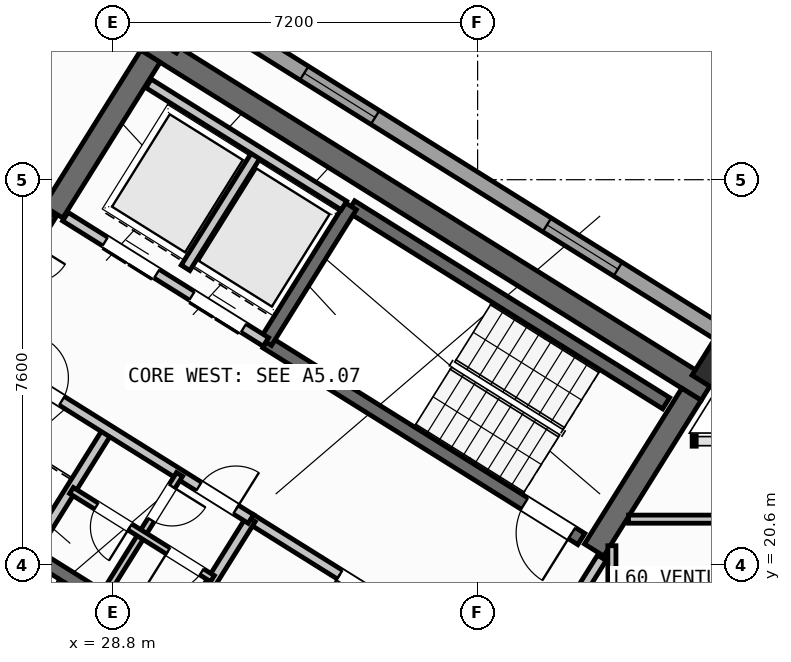
"""IFC4 building model, lengths in metres.
Left out: names, types, materials, properties, quantities, classifications, styles, units other than length and angle.
Written with IfcOpenShell. Run it as: python <this file> out.ifc"""

import sys

from ifc_helpers import new_model, si_unit, direction, frame, frame_2d, origin, origin_2d, place, context, subcontext, project, spatial, rectangle, hollow_rectangle, extrude, source, transform, mapped, element, fill, save


model = new_model("IFC4")
c1 = context("Model", 3, precision=1e-05, world=origin(), true_north=direction((0.0, 1.0)))
c2 = subcontext(c1, "Body", "Model", "MODEL_VIEW")
j1 = project(units=[si_unit("LENGTHUNIT", "METRE"), si_unit("PLANEANGLEUNIT", "RADIAN")], contexts=[c1])
p1 = place(None, origin())
s1 = spatial("IfcSite", under=j1, at=p1, CompositionType="ELEMENT")
p2 = place(p1, origin())
s2 = spatial("IfcBuilding", under=s1, at=p2, CompositionType="ELEMENT")
p3 = place(p2, frame((0.0, 0.0, 238.5)))
s3 = spatial("IfcBuildingStorey", under=s2, at=p3, CompositionType="ELEMENT", Elevation=238.5)
p4 = place(p3, frame((40.531, 24.036, 0.0), z_axis=(0.0, 0.0, 1.0), x_axis=(-0.848048787466, 0.529918157905, 0.0)))
e1 = element("IfcWall", 1, at=p4, inside=s3, PredefinedType="SHEAR", context=c2, shape_type="SweptSolid", body=[
    extrude(rectangle(XDim=13.04, YDim=0.45, at=frame_2d((6.52, 0.0))), origin(), (0.0, 0.0, 1.0), 3.35),
])
for number, where, z_axis, x_axis in (
    (2, (40.221, 23.965, 0.0), (0.0, 0.0, 1.0), (-0.53, -0.848, 0.0)),
    (3, (29.544, 30.636, 0.0), (0.0, 0.0, 1.0), (-0.53, -0.848, 0.0)),
):
    element("IfcWall", number, at=place(p3, frame(where, z_axis=z_axis, x_axis=x_axis)), inside=s3, PredefinedType="SHEAR", context=c2, shape_type="SweptSolid", body=[
        extrude(rectangle(XDim=3.625, YDim=0.45, at=frame_2d((1.812, 0.0))), origin(), (0.0, 0.0, 1.0), 3.35),
    ])
m1 = source(origin(), c2, "Body", "SweptSolid", [
    extrude(hollow_rectangle(XDim=0.8, YDim=0.8, WallThickness=0.032, at=origin_2d()), origin(), (0.0, 0.0, 1.0), 3.6),
])
for number, where, z_axis, x_axis in (
    (4, (40.783, 24.469, 0.0), (0.0, 0.0, 1.0), (-0.848, 0.53, 0.0)),
    (5, (29.928, 31.251, 0.0), (0.0, 0.0, 1.0), (-0.848, 0.53, 0.0)),
):
    element("IfcColumn", number, at=place(p3, frame(where, z_axis=z_axis, x_axis=x_axis)), inside=s3, PredefinedType="COLUMN", context=c2, shape_type="MappedRepresentation", body=[
        mapped(m1, transform((0.0, 0.0, 0.0), scale=1.0)),
    ])
p5 = place(p3, frame((29.268, 6.429, 0.0), z_axis=(0.0, 0.0, 1.0), x_axis=(-0.848049971435, 0.529916263149, 0.0)))
e6 = element("IfcWall", 6, at=p5, inside=s3, PredefinedType="STANDARD", context=c2, shape_type="SweptSolid", body=[
    extrude(rectangle(XDim=31.588, YDim=0.32, at=frame_2d((15.794, 0.0))), origin(), (0.0, 0.0, 1.0), 3.35),
])
p6 = place(p5, frame((16.235, 0.0, 0.0)))
e7 = element("IfcOpeningElement", 7, at=p6, cuts=e6, PredefinedType="OPENING", context=c2, shape_type="SweptSolid", body=[
    extrude(rectangle(XDim=1.2, YDim=2.15, at=frame_2d((0.6, 1.075))), frame((0.0, 0.17, 0.0), z_axis=(0.0, -1.0, 0.0), x_axis=(1.0, 0.0, 0.0)), (0.0, 0.0, 1.0), 0.34),
])
p7 = place(p5, frame((3.859, 0.0, 0.9)))
e8 = element("IfcOpeningElement", 8, at=p7, cuts=e6, PredefinedType="OPENING", context=c2, shape_type="SweptSolid", body=[
    extrude(rectangle(XDim=1.65, YDim=1.45, at=frame_2d((0.825, 0.725))), frame((0.0, 0.17, 0.0), z_axis=(0.0, -1.0, 0.0), x_axis=(1.0, 0.0, 0.0)), (0.0, 0.0, 1.0), 0.34),
])
p8 = place(p5, frame((10.519, 0.0, 0.9)))
e9 = element("IfcOpeningElement", 9, at=p8, cuts=e6, PredefinedType="OPENING", context=c2, shape_type="SweptSolid", body=[
    extrude(rectangle(XDim=1.65, YDim=1.45, at=frame_2d((0.825, 0.725))), frame((0.0, 0.17, 0.0), z_axis=(0.0, -1.0, 0.0), x_axis=(1.0, 0.0, 0.0)), (0.0, 0.0, 1.0), 0.34),
])
p9 = place(p5, frame((19.182, 0.0, 1.0)))
e10 = element("IfcOpeningElement", 10, at=p9, cuts=e6, PredefinedType="OPENING", context=c2, shape_type="SweptSolid", body=[
    extrude(rectangle(XDim=0.9, YDim=1.25, at=frame_2d((0.45, 0.625))), frame((0.0, 0.17, 0.0), z_axis=(0.0, -1.0, 0.0), x_axis=(1.0, 0.0, 0.0)), (0.0, 0.0, 1.0), 0.34),
])
p10 = place(p5, frame((22.524, 0.0, 1.0)))
e11 = element("IfcOpeningElement", 11, at=p10, cuts=e6, PredefinedType="OPENING", context=c2, shape_type="SweptSolid", body=[
    extrude(rectangle(XDim=0.9, YDim=1.25, at=frame_2d((0.45, 0.625))), frame((0.0, 0.17, 0.0), z_axis=(0.0, -1.0, 0.0), x_axis=(1.0, 0.0, 0.0)), (0.0, 0.0, 1.0), 0.34),
])
p11 = place(p5, frame((25.658, 0.0, 0.9)))
e12 = element("IfcOpeningElement", 12, at=p11, cuts=e6, PredefinedType="OPENING", context=c2, shape_type="SweptSolid", body=[
    extrude(rectangle(XDim=1.65, YDim=1.45, at=frame_2d((0.825, 0.725))), frame((0.0, 0.17, 0.0), z_axis=(0.0, -1.0, 0.0), x_axis=(1.0, 0.0, 0.0)), (0.0, 0.0, 1.0), 0.34),
])
p12 = place(p5, frame((29.278, 0.0, 0.9)))
e13 = element("IfcOpeningElement", 13, at=p12, cuts=e6, PredefinedType="OPENING", context=c2, shape_type="SweptSolid", body=[
    extrude(rectangle(XDim=1.35, YDim=1.45, at=frame_2d((0.675, 0.725))), frame((0.0, 0.17, 0.0), z_axis=(0.0, -1.0, 0.0), x_axis=(1.0, 0.0, 0.0)), (0.0, 0.0, 1.0), 0.34),
])
p13 = place(p3, frame((14.138, 41.825, 0.0), z_axis=(0.0, 0.0, 1.0), x_axis=(0.848046498049, -0.529921821731, 0.0)))
e14 = element("IfcWall", 14, at=p13, inside=s3, PredefinedType="STANDARD", context=c2, shape_type="SweptSolid", body=[
    extrude(rectangle(XDim=31.588, YDim=0.32, at=frame_2d((15.794, 0.0))), origin(), (0.0, 0.0, 1.0), 3.35),
])
p14 = place(p13, frame((9.712, 0.0, 0.0)))
e15 = element("IfcOpeningElement", 15, at=p14, cuts=e14, PredefinedType="OPENING", context=c2, shape_type="SweptSolid", body=[
    extrude(rectangle(XDim=1.05, YDim=2.15, at=frame_2d((0.525, 1.075))), frame((0.0, 0.17, 0.0), z_axis=(0.0, -1.0, 0.0), x_axis=(1.0, 0.0, 0.0)), (0.0, 0.0, 1.0), 0.34),
])
p15 = place(p13, frame((0.841, 0.0, 0.9)))
e16 = element("IfcOpeningElement", 16, at=p15, cuts=e14, PredefinedType="OPENING", context=c2, shape_type="SweptSolid", body=[
    extrude(rectangle(XDim=1.65, YDim=1.45, at=frame_2d((0.825, 0.725))), frame((0.0, 0.17, 0.0), z_axis=(0.0, -1.0, 0.0), x_axis=(1.0, 0.0, 0.0)), (0.0, 0.0, 1.0), 0.34),
])
p16 = place(p13, frame((4.171, 0.0, 1.0)))
e17 = element("IfcOpeningElement", 17, at=p16, cuts=e14, PredefinedType="OPENING", context=c2, shape_type="SweptSolid", body=[
    extrude(rectangle(XDim=0.9, YDim=1.25, at=frame_2d((0.45, 0.625))), frame((0.0, 0.17, 0.0), z_axis=(0.0, -1.0, 0.0), x_axis=(1.0, 0.0, 0.0)), (0.0, 0.0, 1.0), 0.34),
])
p17 = place(p13, frame((13.624, 0.0, 0.95)))
e18 = element("IfcOpeningElement", 18, at=p17, cuts=e14, PredefinedType="OPENING", context=c2, shape_type="SweptSolid", body=[
    extrude(rectangle(XDim=1.95, YDim=1.35, at=frame_2d((0.975, 0.675))), frame((0.0, 0.17, 0.0), z_axis=(0.0, -1.0, 0.0), x_axis=(1.0, 0.0, 0.0)), (0.0, 0.0, 1.0), 0.34),
])
p18 = place(p13, frame((17.129, 0.0, 1.0)))
e19 = element("IfcOpeningElement", 19, at=p18, cuts=e14, PredefinedType="OPENING", context=c2, shape_type="SweptSolid", body=[
    extrude(rectangle(XDim=0.9, YDim=1.25, at=frame_2d((0.45, 0.625))), frame((0.0, 0.17, 0.0), z_axis=(0.0, -1.0, 0.0), x_axis=(1.0, 0.0, 0.0)), (0.0, 0.0, 1.0), 0.34),
])
p19 = place(p13, frame((21.744, 0.0, 0.9)))
e20 = element("IfcOpeningElement", 20, at=p19, cuts=e14, PredefinedType="OPENING", context=c2, shape_type="SweptSolid", body=[
    extrude(rectangle(XDim=1.65, YDim=1.45, at=frame_2d((0.825, 0.725))), frame((0.0, 0.17, 0.0), z_axis=(0.0, -1.0, 0.0), x_axis=(1.0, 0.0, 0.0)), (0.0, 0.0, 1.0), 0.34),
])
p20 = place(p13, frame((27.394, 0.0, 0.9)))
e21 = element("IfcOpeningElement", 21, at=p20, cuts=e14, PredefinedType="OPENING", context=c2, shape_type="SweptSolid", body=[
    extrude(rectangle(XDim=1.65, YDim=1.45, at=frame_2d((0.825, 0.725))), frame((0.0, 0.17, 0.0), z_axis=(0.0, -1.0, 0.0), x_axis=(1.0, 0.0, 0.0)), (0.0, 0.0, 1.0), 0.34),
])
p21 = place(p3, frame((31.28, 18.261, 0.0), z_axis=(0.0, 0.0, 1.0), x_axis=(-0.848051618787, 0.529913626805, 0.0)))
e22 = element("IfcWall", 22, at=p21, inside=s3, PredefinedType="SHEAR", context=c2, shape_type="SweptSolid", body=[
    extrude(rectangle(XDim=7.46, YDim=0.26, at=frame_2d((3.73, 0.0))), origin(), (0.0, 0.0, 1.0), 3.35),
])
p22 = place(p21, frame((0.36, 0.0, 0.0)))
e23 = element("IfcOpeningElement", 23, at=p22, cuts=e22, PredefinedType="OPENING", context=c2, shape_type="SweptSolid", body=[
    extrude(rectangle(XDim=0.86, YDim=2.05, at=frame_2d((0.43, 1.025))), frame((0.0, 0.14, 0.0), z_axis=(0.0, -1.0, 0.0), x_axis=(1.0, 0.0, 0.0)), (0.0, 0.0, 1.0), 0.28),
])
p23 = place(p3, frame((39.721, 23.788, 0.0), z_axis=(0.0, 0.0, 1.0), x_axis=(-0.848054434086, 0.529909121291, 0.0)))
e24 = element("IfcWall", 24, at=p23, inside=s3, PredefinedType="SHEAR", context=c2, shape_type="SweptSolid", body=[
    extrude(rectangle(XDim=7.33, YDim=0.26, at=frame_2d((3.665, 0.0))), origin(), (0.0, 0.0, 1.0), 3.35),
])
p24 = place(p3, frame((38.046, 21.108, 0.0), z_axis=(0.0, 0.0, 1.0), x_axis=(-0.848054434086, 0.529909121291, 0.0)))
e25 = element("IfcWall", 25, at=p24, inside=s3, PredefinedType="SHEAR", context=c2, shape_type="SweptSolid", body=[
    extrude(rectangle(XDim=7.33, YDim=0.26, at=frame_2d((3.665, 0.0))), origin(), (0.0, 0.0, 1.0), 3.35),
])
p25 = place(p24, frame((0.22, 0.0, 0.0)))
e26 = element("IfcOpeningElement", 26, at=p25, cuts=e25, PredefinedType="OPENING", context=c2, shape_type="SweptSolid", body=[
    extrude(rectangle(XDim=1.1, YDim=2.1, at=frame_2d((0.55, 1.05))), frame((0.0, 0.14, 0.0), z_axis=(0.0, -1.0, 0.0), x_axis=(1.0, 0.0, 0.0)), (0.0, 0.0, 1.0), 0.28),
])
p26 = place(p3, frame((33.496, 27.677, 0.0), z_axis=(0.0, 0.0, 1.0), x_axis=(-0.529908658664, -0.84805472316, 0.0)))
e27 = element("IfcWall", 27, at=p26, inside=s3, PredefinedType="SHEAR", context=c2, shape_type="SweptSolid", body=[
    extrude(rectangle(XDim=3.16, YDim=0.26, at=frame_2d((1.58, 0.0))), origin(), (0.0, 0.0, 1.0), 3.35),
])
p27 = place(p3, frame((36.459, 18.421, 0.0), z_axis=(0.0, 0.0, 1.0), x_axis=(-0.848059591691, 0.529900867089, 0.0)))
e28 = element("IfcWall", 28, at=p27, inside=s3, PredefinedType="STANDARD", context=c2, shape_type="SweptSolid", body=[
    extrude(rectangle(XDim=5.818, YDim=0.2, at=frame_2d((2.909, 0.0))), origin(), (0.0, 0.0, 1.0), 3.34),
])
p28 = place(p27, frame((2.598, 0.0, 0.0)))
e29 = element("IfcOpeningElement", 29, at=p28, cuts=e28, PredefinedType="OPENING", context=c2, shape_type="SweptSolid", body=[
    extrude(rectangle(XDim=1.15, YDim=2.1, at=frame_2d((0.575, 1.05))), frame((0.0, 0.11, 0.0), z_axis=(0.0, -1.0, 0.0), x_axis=(1.0, 0.0, 0.0)), (0.0, 0.0, 1.0), 0.22),
])
p29 = place(p3, frame((31.822, 24.998, 0.0), z_axis=(0.0, 0.0, 1.0), x_axis=(-0.848054125777, 0.529909614701, 0.0)))
e30 = element("IfcWall", 30, at=p29, inside=s3, PredefinedType="STANDARD", context=c2, shape_type="SweptSolid", body=[
    extrude(rectangle(XDim=4.668, YDim=0.2, at=frame_2d((2.334, 0.0))), origin(), (0.0, 0.0, 1.0), 3.34),
])
p30 = place(p29, frame((0.52, 0.0, 0.0)))
e31 = element("IfcOpeningElement", 31, at=p30, cuts=e30, PredefinedType="OPENING", context=c2, shape_type="SweptSolid", body=[
    extrude(rectangle(XDim=1.2, YDim=2.15, at=frame_2d((0.6, 1.075))), frame((0.0, 0.11, 0.0), z_axis=(0.0, -1.0, 0.0), x_axis=(1.0, 0.0, 0.0)), (0.0, 0.0, 1.0), 0.22),
])
p31 = place(p29, frame((2.54, 0.0, 0.0)))
e32 = element("IfcOpeningElement", 32, at=p31, cuts=e30, PredefinedType="OPENING", context=c2, shape_type="SweptSolid", body=[
    extrude(rectangle(XDim=1.2, YDim=2.15, at=frame_2d((0.6, 1.075))), frame((0.0, 0.11, 0.0), z_axis=(0.0, -1.0, 0.0), x_axis=(1.0, 0.0, 0.0)), (0.0, 0.0, 1.0), 0.22),
])
p32 = place(p3, frame((31.645, 28.716, 0.0), z_axis=(0.0, 0.0, 1.0), x_axis=(-0.52986693015, -0.848080795876, 0.0)))
e33 = element("IfcWall", 33, at=p32, inside=s3, PredefinedType="STANDARD", context=c2, shape_type="SweptSolid", body=[
    extrude(rectangle(XDim=2.66, YDim=0.2, at=frame_2d((1.33, 0.0))), origin(), (0.0, 0.0, 1.0), 3.34),
])
p33 = place(p3, frame((33.363, 27.69, 0.0), z_axis=(0.0, 0.0, 1.0), x_axis=(-0.84804957148, 0.529916903215, 0.0)))
e34 = element("IfcWall", 34, at=p33, inside=s3, PredefinedType="STANDARD", context=c2, shape_type="SweptSolid", body=[
    extrude(rectangle(XDim=4.548, YDim=0.2, at=frame_2d((2.274, 0.0))), origin(), (0.0, 0.0, 1.0), 3.34),
])
for number, where, z_axis, x_axis in (
    (35, (31.525, 21.504, 0.0), (0.0, 0.0, 1.0), (-0.53, -0.848, 0.0)),
    (36, (28.71, 23.263, 0.0), (0.0, 0.0, 1.0), (-0.53, -0.848, 0.0)),
):
    element("IfcWall", number, at=place(p3, frame(where, z_axis=z_axis, x_axis=x_axis)), inside=s3, PredefinedType="STANDARD", context=c2, shape_type="SweptSolid", body=[
        extrude(rectangle(XDim=2.88, YDim=0.2, at=frame_2d((1.44, 0.0))), origin(), (0.0, 0.0, 1.0), 3.34),
    ])
p34 = place(p3, frame((31.525, 21.504, 0.0), z_axis=(0.0, 0.0, 1.0), x_axis=(-0.848042066329, 0.529928913853, 0.0)))
e37 = element("IfcWall", 37, at=p34, inside=s3, PredefinedType="STANDARD", context=c2, shape_type="SweptSolid", body=[
    extrude(rectangle(XDim=6.268, YDim=0.2, at=frame_2d((3.134, 0.0))), origin(), (0.0, 0.0, 1.0), 3.34),
])
p35 = place(p34, frame((4.4, 0.0, 0.0)))
e38 = element("IfcOpeningElement", 38, at=p35, cuts=e37, PredefinedType="OPENING", context=c2, shape_type="SweptSolid", body=[
    extrude(rectangle(XDim=0.86, YDim=2.05, at=frame_2d((0.43, 1.025))), frame((0.0, 0.11, 0.0), z_axis=(0.0, -1.0, 0.0), x_axis=(1.0, 0.0, 0.0)), (0.0, 0.0, 1.0), 0.22),
])
p36 = place(p34, frame((0.35, 0.0, 0.0)))
e39 = element("IfcOpeningElement", 39, at=p36, cuts=e37, PredefinedType="OPENING", context=c2, shape_type="SweptSolid", body=[
    extrude(rectangle(XDim=0.86, YDim=2.05, at=frame_2d((0.43, 1.025))), frame((0.0, 0.11, 0.0), z_axis=(0.0, -1.0, 0.0), x_axis=(1.0, 0.0, 0.0)), (0.0, 0.0, 1.0), 0.22),
])
p37 = place(p3, frame((30.117, 22.384, 0.0), z_axis=(0.0, 0.0, 1.0), x_axis=(-0.529951914384, -0.848027693204, 0.0)))
e40 = element("IfcWall", 40, at=p37, inside=s3, PredefinedType="PLUMBINGWALL", context=c2, shape_type="SweptSolid", body=[
    extrude(rectangle(XDim=1.4, YDim=0.14, at=frame_2d((0.7, 0.0))), origin(), (0.0, 0.0, 1.0), 3.34),
])
p38 = place(p37, frame((0.28, 0.0, 0.0)))
e41 = element("IfcOpeningElement", 41, at=p38, cuts=e40, PredefinedType="OPENING", context=c2, shape_type="SweptSolid", body=[
    extrude(rectangle(XDim=0.78, YDim=2.05, at=frame_2d((0.39, 1.025))), frame((0.0, 0.08, 0.0), z_axis=(0.0, -1.0, 0.0), x_axis=(1.0, 0.0, 0.0)), (0.0, 0.0, 1.0), 0.16),
])
p39 = place(p3, frame((29.375, 21.196, 0.0), z_axis=(0.0, 0.0, 1.0), x_axis=(-0.529865479138, -0.848081702443, 0.0)))
e42 = element("IfcWall", 42, at=p39, inside=s3, PredefinedType="PLUMBINGWALL", context=c2, shape_type="SweptSolid", body=[
    extrude(rectangle(XDim=1.48, YDim=0.14, at=frame_2d((0.74, 0.0))), origin(), (0.0, 0.0, 1.0), 3.34),
])
p40 = place(p3, frame((30.766, 20.327, 0.0), z_axis=(0.0, 0.0, 1.0), x_axis=(-0.848052663127, 0.529911955482, 0.0)))
e43 = element("IfcWall", 43, at=p40, inside=s3, PredefinedType="PLUMBINGWALL", context=c2, shape_type="SweptSolid", body=[
    extrude(rectangle(XDim=3.28, YDim=0.14, at=frame_2d((1.64, 0.0))), origin(), (0.0, 0.0, 1.0), 3.34),
])
p41 = place(p40, frame((0.25, 0.0, 0.0)))
e44 = element("IfcOpeningElement", 44, at=p41, cuts=e43, PredefinedType="OPENING", context=c2, shape_type="SweptSolid", body=[
    extrude(rectangle(XDim=0.78, YDim=2.05, at=frame_2d((0.39, 1.025))), frame((0.0, 0.08, 0.0), z_axis=(0.0, -1.0, 0.0), x_axis=(1.0, 0.0, 0.0)), (0.0, 0.0, 1.0), 0.16),
])
p42 = place(p40, frame((1.92, 0.0, 0.0)))
e45 = element("IfcOpeningElement", 45, at=p42, cuts=e43, PredefinedType="OPENING", context=c2, shape_type="SweptSolid", body=[
    extrude(rectangle(XDim=0.78, YDim=2.05, at=frame_2d((0.39, 1.025))), frame((0.0, 0.08, 0.0), z_axis=(0.0, -1.0, 0.0), x_axis=(1.0, 0.0, 0.0)), (0.0, 0.0, 1.0), 0.16),
])
p43 = place(p3, frame((27.596, 27.52, 0.0), z_axis=(0.0, 0.0, 1.0), x_axis=(-0.529865479138, -0.848081702443, 0.0)))
e46 = element("IfcWall", 46, at=p43, inside=s3, PredefinedType="STANDARD", context=c2, shape_type="SweptSolid", body=[
    extrude(rectangle(XDim=2.96, YDim=0.2, at=frame_2d((1.48, 0.0))), origin(), (0.0, 0.0, 1.0), 3.34),
])
p44 = place(p43, frame((0.7, 0.0, 0.0)))
e47 = element("IfcOpeningElement", 47, at=p44, cuts=e46, PredefinedType="OPENING", context=c2, shape_type="SweptSolid", body=[
    extrude(rectangle(XDim=1.5, YDim=2.15, at=frame_2d((0.75, 1.075))), frame((0.0, 0.11, 0.0), z_axis=(0.0, -1.0, 0.0), x_axis=(1.0, 0.0, 0.0)), (0.0, 0.0, 1.0), 0.22),
])
p45 = place(p3, frame((27.57, 27.478, 0.0), z_axis=(0.0, 0.0, 1.0), x_axis=(-0.848050851465, 0.529914854792, 0.0)))
e48 = element("IfcWall", 48, at=p45, inside=s3, PredefinedType="PARTITIONING", context=c2, shape_type="SweptSolid", body=[
    extrude(rectangle(XDim=2.61, YDim=0.16, at=frame_2d((1.305, 0.0))), origin(), (0.0, 0.0, 1.0), 3.34),
])
p46 = place(p45, frame((0.95, 0.0, 0.0)))
e49 = element("IfcOpeningElement", 49, at=p46, cuts=e48, PredefinedType="OPENING", context=c2, shape_type="SweptSolid", body=[
    extrude(rectangle(XDim=0.86, YDim=2.05, at=frame_2d((0.43, 1.025))), frame((0.0, 0.09, 0.0), z_axis=(0.0, -1.0, 0.0), x_axis=(1.0, 0.0, 0.0)), (0.0, 0.0, 1.0), 0.18),
])
p47 = place(p3, frame((27.953, 33.016, 0.0), z_axis=(0.0, 0.0, 1.0), x_axis=(-0.529903001606, -0.848058257957, 0.0)))
e50 = element("IfcWall", 50, at=p47, inside=s3, PredefinedType="PARTITIONING", context=c2, shape_type="SweptSolid", body=[
    extrude(rectangle(XDim=9.15, YDim=0.16, at=frame_2d((4.575, 0.0))), origin(), (0.0, 0.0, 1.0), 3.34),
])
p48 = place(p3, frame((38.451, 20.737, 0.0), z_axis=(0.0, 0.0, 1.0), x_axis=(-0.529924799939, -0.848044637038, 0.0)))
e51 = element("IfcWall", 51, at=p48, inside=s3, PredefinedType="STANDARD", context=c2, shape_type="SweptSolid", body=[
    extrude(rectangle(XDim=2.96, YDim=0.2, at=frame_2d((1.48, 0.0))), origin(), (0.0, 0.0, 1.0), 3.34),
])
p49 = place(p48, frame((1.46, 0.0, 0.0)))
e52 = element("IfcOpeningElement", 52, at=p49, cuts=e51, PredefinedType="OPENING", context=c2, shape_type="SweptSolid", body=[
    extrude(rectangle(XDim=0.86, YDim=2.05, at=frame_2d((0.43, 1.025))), frame((0.0, 0.11, 0.0), z_axis=(0.0, -1.0, 0.0), x_axis=(1.0, 0.0, 0.0)), (0.0, 0.0, 1.0), 0.22),
])
p50 = place(p3, frame((38.65, 17.93, 0.0), z_axis=(0.0, 0.0, 1.0), x_axis=(0.0, 1.0, 0.0)))
e53 = element("IfcWall", 53, at=p50, inside=s3, PredefinedType="PARTITIONING", context=c2, shape_type="SweptSolid", body=[
    extrude(rectangle(XDim=3.046, YDim=0.16, at=frame_2d((1.523, 0.0))), origin(), (0.0, 0.0, 1.0), 3.34),
])
p51 = place(p3, frame((38.978, 21.5, 0.0), z_axis=(0.0, 0.0, 1.0), x_axis=(1.0, 0.0, 0.0)))
e54 = element("IfcWall", 54, at=p51, inside=s3, PredefinedType="PARTITIONING", context=c2, shape_type="SweptSolid", body=[
    extrude(rectangle(XDim=7.336, YDim=0.16, at=frame_2d((3.668, 0.0))), origin(), (0.0, 0.0, 1.0), 3.34),
])
m2 = source(origin(), c2, "Body", "SweptSolid", [
    extrude(rectangle(XDim=1.65, YDim=1.45, at=frame_2d((0.825, 0.725))), frame((0.0, 0.03, 0.0), z_axis=(0.0, -1.0, 0.0), x_axis=(1.0, 0.0, 0.0)), (0.0, 0.0, 1.0), 0.06),
])
p52 = place(p19, origin())
e55 = element("IfcWindow", 55, at=p52, inside=s3, PartitioningType="SINGLE_PANEL", PredefinedType="WINDOW", context=c2, shape_type="MappedRepresentation", body=[
    mapped(m2, transform((0.0, 0.0, 0.0), scale=1.0)),
])
fill(e20, e55)
p53 = place(p20, origin())
e56 = element("IfcWindow", 56, at=p53, inside=s3, PartitioningType="SINGLE_PANEL", PredefinedType="WINDOW", context=c2, shape_type="MappedRepresentation", body=[
    mapped(m2, transform((0.0, 0.0, 0.0), scale=1.0)),
])
fill(e21, e56)
m3 = source(origin(), c2, "Body", "SweptSolid", [
    extrude(rectangle(XDim=1.1, YDim=2.1, at=frame_2d((0.55, 1.05))), frame((0.0, 0.025, 0.0), z_axis=(0.0, -1.0, 0.0), x_axis=(1.0, 0.0, 0.0)), (0.0, 0.0, 1.0), 0.05),
])
p54 = place(p25, origin())
e57 = element("IfcDoor", 57, at=p54, inside=s3, OperationType="SINGLE_SWING_LEFT", PredefinedType="DOOR", context=c2, shape_type="MappedRepresentation", body=[
    mapped(m3, transform((0.0, 0.0, 0.0), scale=1.0)),
])
fill(e26, e57)
m4 = source(origin(), c2, "Body", "SweptSolid", [
    extrude(rectangle(XDim=1.15, YDim=2.1, at=frame_2d((0.575, 1.05))), frame((0.0, 0.025, 0.0), z_axis=(0.0, -1.0, 0.0), x_axis=(1.0, 0.0, 0.0)), (0.0, 0.0, 1.0), 0.05),
])
p55 = place(p28, origin())
e58 = element("IfcDoor", 58, at=p55, inside=s3, OperationType="SINGLE_SWING_RIGHT", PredefinedType="DOOR", context=c2, shape_type="MappedRepresentation", body=[
    mapped(m4, transform((0.0, 0.0, 0.0), scale=1.0)),
])
fill(e29, e58)
m5 = source(origin(), c2, "Body", "SweptSolid", [
    extrude(rectangle(XDim=1.2, YDim=2.15, at=frame_2d((0.6, 1.075))), frame((0.0, 0.025, 0.0), z_axis=(0.0, -1.0, 0.0), x_axis=(1.0, 0.0, 0.0)), (0.0, 0.0, 1.0), 0.05),
])
p56 = place(p30, origin())
e59 = element("IfcDoor", 59, at=p56, inside=s3, OperationType="DOUBLE_DOOR_SLIDING", PredefinedType="DOOR", context=c2, shape_type="MappedRepresentation", body=[
    mapped(m5, transform((0.0, 0.0, 0.0), scale=1.0)),
])
fill(e31, e59)
p57 = place(p31, origin())
e60 = element("IfcDoor", 60, at=p57, inside=s3, OperationType="DOUBLE_DOOR_SLIDING", PredefinedType="DOOR", context=c2, shape_type="MappedRepresentation", body=[
    mapped(m5, transform((0.0, 0.0, 0.0), scale=1.0)),
])
fill(e32, e60)
m6 = source(origin(), c2, "Body", "SweptSolid", [
    extrude(rectangle(XDim=0.86, YDim=2.05, at=frame_2d((0.43, 1.025))), frame((0.0, 0.025, 0.0), z_axis=(0.0, -1.0, 0.0), x_axis=(1.0, 0.0, 0.0)), (0.0, 0.0, 1.0), 0.05),
])
p58 = place(p35, frame((0.86, 0.0, 0.0), z_axis=(0.0, 0.0, 1.0), x_axis=(-1.0, 0.0, 0.0)))
e61 = element("IfcDoor", 61, at=p58, inside=s3, OperationType="SINGLE_SWING_LEFT", PredefinedType="DOOR", context=c2, shape_type="MappedRepresentation", body=[
    mapped(m6, transform((0.0, 0.0, 0.0), scale=1.0)),
])
fill(e38, e61)
p59 = place(p36, frame((0.86, 0.0, 0.0), z_axis=(0.0, 0.0, 1.0), x_axis=(-1.0, 0.0, 0.0)))
e62 = element("IfcDoor", 62, at=p59, inside=s3, OperationType="SINGLE_SWING_RIGHT", PredefinedType="DOOR", context=c2, shape_type="MappedRepresentation", body=[
    mapped(m6, transform((0.0, 0.0, 0.0), scale=1.0)),
])
fill(e39, e62)
m7 = source(origin(), c2, "Body", "SweptSolid", [
    extrude(rectangle(XDim=0.78, YDim=2.05, at=frame_2d((0.39, 1.025))), frame((0.0, 0.025, 0.0), z_axis=(0.0, -1.0, 0.0), x_axis=(1.0, 0.0, 0.0)), (0.0, 0.0, 1.0), 0.05),
])
p60 = place(p38, origin())
e63 = element("IfcDoor", 63, at=p60, inside=s3, OperationType="SINGLE_SWING_LEFT", PredefinedType="DOOR", context=c2, shape_type="MappedRepresentation", body=[
    mapped(m7, transform((0.0, 0.0, 0.0), scale=1.0)),
])
fill(e41, e63)
p61 = place(p41, origin())
e64 = element("IfcDoor", 64, at=p61, inside=s3, OperationType="SINGLE_SWING_RIGHT", PredefinedType="DOOR", context=c2, shape_type="MappedRepresentation", body=[
    mapped(m7, transform((0.0, 0.0, 0.0), scale=1.0)),
])
fill(e44, e64)
p62 = place(p42, origin())
e65 = element("IfcDoor", 65, at=p62, inside=s3, OperationType="SINGLE_SWING_LEFT", PredefinedType="DOOR", context=c2, shape_type="MappedRepresentation", body=[
    mapped(m7, transform((0.0, 0.0, 0.0), scale=1.0)),
])
fill(e45, e65)
save(model, sys.argv[1])
